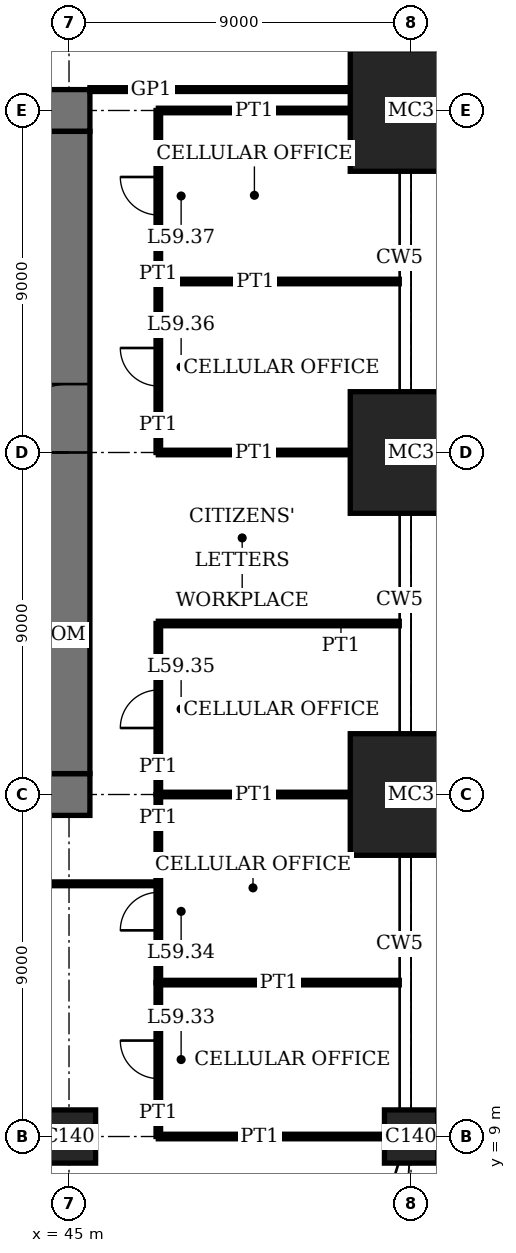
"""IFC4 building model, lengths in metres.
Left out: names, types, materials, properties, quantities, classifications, styles, units other than length and angle.
Written with IfcOpenShell. Run it as: python <this file> out.ifc"""

import sys

from ifc_helpers import new_model, si_unit, direction, frame, frame_2d, origin, origin_2d, place, context, subcontext, project, spatial, rectangle, extrude, element, fill, save


model = new_model("IFC4")
c1 = context("Model", 3, precision=1e-05, world=origin(), true_north=direction((0.0, 1.0)))
c2 = subcontext(c1, "Body", "Model", "MODEL_VIEW")
j1 = project(units=[si_unit("LENGTHUNIT", "METRE"), si_unit("PLANEANGLEUNIT", "RADIAN")], contexts=[c1])
p1 = place(None, origin())
s1 = spatial("IfcSite", under=j1, at=p1, CompositionType="ELEMENT")
p2 = place(p1, origin())
s2 = spatial("IfcBuilding", under=s1, at=p2, CompositionType="ELEMENT")
p3 = place(p2, frame((0.0, 0.0, 243.4)))
s3 = spatial("IfcBuildingStorey", under=s2, at=p3, CompositionType="ELEMENT", Elevation=243.4)
for number, where, z_axis, x_axis in (
    (1, (45.0, 9.0, 0.0), (0.0, 0.0, 1.0), (1.0, 0.0, 0.0)),
    (2, (54.0, 9.0, 0.0), (0.0, 0.0, 1.0), (1.0, 0.0, 0.0)),
):
    element("IfcColumn", number, at=place(p3, frame(where, z_axis=z_axis, x_axis=x_axis)), inside=s3, PredefinedType="COLUMN", context=c2, shape_type="SweptSolid", body=[
        extrude(rectangle(XDim=1.4, YDim=1.4, at=origin_2d()), origin(), (0.0, 0.0, 1.0), 4.0),
    ])
for number, where, z_axis, x_axis in (
    (3, (54.0, 18.0, 0.0), (0.0, 0.0, 1.0), (1.0, 0.0, 0.0)),
    (4, (54.0, 27.0, 0.0), (0.0, 0.0, 1.0), (1.0, 0.0, 0.0)),
    (5, (54.0, 36.0, 0.0), (0.0, 0.0, 1.0), (1.0, 0.0, 0.0)),
):
    element("IfcColumn", number, at=place(p3, frame(where, z_axis=z_axis, x_axis=x_axis)), inside=s3, PredefinedType="COLUMN", context=c2, shape_type="SweptSolid", body=[
        extrude(rectangle(XDim=3.2, YDim=3.2, at=origin_2d()), origin(), (0.0, 0.0, 1.0), 4.0),
    ])
p4 = place(p3, frame((17.45, 18.0, 0.0), z_axis=(0.0, 0.0, 1.0), x_axis=(1.0, 0.0, 0.0)))
e6 = element("IfcWall", 6, at=p4, inside=s3, PredefinedType="SHEAR", context=c2, shape_type="SweptSolid", body=[
    extrude(rectangle(XDim=28.1, YDim=1.1, at=frame_2d((14.05, 0.0))), origin(), (0.0, 0.0, 1.0), 4.0),
])
p5 = place(p4, frame((11.55, 0.0, 0.0)))
e7 = element("IfcOpeningElement", 7, at=p5, cuts=e6, PredefinedType="OPENING", context=c2, shape_type="SweptSolid", body=[
    extrude(rectangle(XDim=1.0, YDim=2.4, at=frame_2d((0.5, 1.2))), frame((0.0, 0.56, 0.0), z_axis=(0.0, -1.0, 0.0), x_axis=(1.0, 0.0, 0.0)), (0.0, 0.0, 1.0), 1.12),
])
p6 = place(p4, frame((16.55, 0.0, 0.0)))
e8 = element("IfcOpeningElement", 8, at=p6, cuts=e6, PredefinedType="OPENING", context=c2, shape_type="SweptSolid", body=[
    extrude(rectangle(XDim=1.0, YDim=2.4, at=frame_2d((0.5, 1.2))), frame((0.0, 0.56, 0.0), z_axis=(0.0, -1.0, 0.0), x_axis=(1.0, 0.0, 0.0)), (0.0, 0.0, 1.0), 1.12),
])
p7 = place(p4, frame((20.0, 0.0, 0.0)))
e9 = element("IfcOpeningElement", 9, at=p7, cuts=e6, PredefinedType="OPENING", context=c2, shape_type="SweptSolid", body=[
    extrude(rectangle(XDim=1.1, YDim=2.4, at=frame_2d((0.55, 1.2))), frame((0.0, 0.56, 0.0), z_axis=(0.0, -1.0, 0.0), x_axis=(1.0, 0.0, 0.0)), (0.0, 0.0, 1.0), 1.12),
])
p8 = place(p4, frame((24.05, 0.0, 0.0)))
e10 = element("IfcOpeningElement", 10, at=p8, cuts=e6, PredefinedType="OPENING", context=c2, shape_type="SweptSolid", body=[
    extrude(rectangle(XDim=1.0, YDim=2.4, at=frame_2d((0.5, 1.2))), frame((0.0, 0.56, 0.0), z_axis=(0.0, -1.0, 0.0), x_axis=(1.0, 0.0, 0.0)), (0.0, 0.0, 1.0), 1.12),
])
p9 = place(p3, frame((45.55, 36.0, 0.0), z_axis=(0.0, 0.0, 1.0), x_axis=(-1.0, 0.0, 0.0)))
e11 = element("IfcWall", 11, at=p9, inside=s3, PredefinedType="SHEAR", context=c2, shape_type="SweptSolid", body=[
    extrude(rectangle(XDim=28.1, YDim=1.1, at=frame_2d((14.05, 0.0))), origin(), (0.0, 0.0, 1.0), 4.0),
])
p10 = place(p9, frame((11.55, 0.0, 0.0)))
e12 = element("IfcOpeningElement", 12, at=p10, cuts=e11, PredefinedType="OPENING", context=c2, shape_type="SweptSolid", body=[
    extrude(rectangle(XDim=1.0, YDim=2.4, at=frame_2d((0.5, 1.2))), frame((0.0, 0.56, 0.0), z_axis=(0.0, -1.0, 0.0), x_axis=(1.0, 0.0, 0.0)), (0.0, 0.0, 1.0), 1.12),
])
p11 = place(p9, frame((16.55, 0.0, 0.0)))
e13 = element("IfcOpeningElement", 13, at=p11, cuts=e11, PredefinedType="OPENING", context=c2, shape_type="SweptSolid", body=[
    extrude(rectangle(XDim=1.0, YDim=2.4, at=frame_2d((0.5, 1.2))), frame((0.0, 0.56, 0.0), z_axis=(0.0, -1.0, 0.0), x_axis=(1.0, 0.0, 0.0)), (0.0, 0.0, 1.0), 1.12),
])
p12 = place(p9, frame((20.0, 0.0, 0.0)))
e14 = element("IfcOpeningElement", 14, at=p12, cuts=e11, PredefinedType="OPENING", context=c2, shape_type="SweptSolid", body=[
    extrude(rectangle(XDim=1.1, YDim=2.4, at=frame_2d((0.55, 1.2))), frame((0.0, 0.56, 0.0), z_axis=(0.0, -1.0, 0.0), x_axis=(1.0, 0.0, 0.0)), (0.0, 0.0, 1.0), 1.12),
])
p13 = place(p9, frame((24.05, 0.0, 0.0)))
e15 = element("IfcOpeningElement", 15, at=p13, cuts=e11, PredefinedType="OPENING", context=c2, shape_type="SweptSolid", body=[
    extrude(rectangle(XDim=1.0, YDim=2.4, at=frame_2d((0.5, 1.2))), frame((0.0, 0.56, 0.0), z_axis=(0.0, -1.0, 0.0), x_axis=(1.0, 0.0, 0.0)), (0.0, 0.0, 1.0), 1.12),
])
p14 = place(p3, frame((45.0, 18.55, 0.0), z_axis=(0.0, 0.0, 1.0), x_axis=(0.0, 1.0, 0.0)))
e16 = element("IfcWall", 16, at=p14, inside=s3, PredefinedType="SHEAR", context=c2, shape_type="SweptSolid", body=[
    extrude(rectangle(XDim=16.9, YDim=1.1, at=frame_2d((8.45, 0.0))), origin(), (0.0, 0.0, 1.0), 4.0),
])
p15 = place(p14, frame((8.45, 0.0, 0.0)))
e17 = element("IfcOpeningElement", 17, at=p15, cuts=e16, PredefinedType="OPENING", context=c2, shape_type="SweptSolid", body=[
    extrude(rectangle(XDim=1.8, YDim=2.4, at=frame_2d((0.9, 1.2))), frame((0.0, 0.56, 0.0), z_axis=(0.0, -1.0, 0.0), x_axis=(1.0, 0.0, 0.0)), (0.0, 0.0, 1.0), 1.12),
])
p16 = place(p3, frame((47.35, 9.0, 0.0), z_axis=(0.0, 0.0, 1.0), x_axis=(1.0, 0.0, 0.0)))
e18 = element("IfcWall", 18, at=p16, inside=s3, PredefinedType="PARTITIONING", context=c2, shape_type="SweptSolid", body=[
    extrude(rectangle(XDim=5.95, YDim=0.12, at=frame_2d((2.975, 0.0))), origin(), (0.0, 0.0, 1.0), 3.05),
])
p17 = place(p3, frame((47.35, 13.05, 0.0), z_axis=(0.0, 0.0, 1.0), x_axis=(1.0, 0.0, 0.0)))
e19 = element("IfcWall", 19, at=p17, inside=s3, PredefinedType="PARTITIONING", context=c2, shape_type="SweptSolid", body=[
    extrude(rectangle(XDim=6.34, YDim=0.12, at=frame_2d((3.17, 0.0))), origin(), (0.0, 0.0, 1.0), 3.75),
])
p18 = place(p3, frame((36.01, 15.65, 0.0), z_axis=(0.0, 0.0, 1.0), x_axis=(1.0, 0.0, 0.0)))
e20 = element("IfcWall", 20, at=p18, inside=s3, PredefinedType="PARTITIONING", context=c2, shape_type="SweptSolid", body=[
    extrude(rectangle(XDim=11.33, YDim=0.1, at=frame_2d((5.665, 0.0))), origin(), (0.0, 0.0, 1.0), 3.75),
])
p19 = place(p18, frame((5.165, 0.0, 0.0)))
e21 = element("IfcOpeningElement", 21, at=p19, cuts=e20, PredefinedType="OPENING", context=c2, shape_type="SweptSolid", body=[
    extrude(rectangle(XDim=1.0, YDim=2.4, at=frame_2d((0.5, 1.2))), frame((0.0, 0.06, 0.0), z_axis=(0.0, -1.0, 0.0), x_axis=(1.0, 0.0, 0.0)), (0.0, 0.0, 1.0), 0.12),
])
p20 = place(p3, frame((47.35, 18.0, 0.0), z_axis=(0.0, 0.0, 1.0), x_axis=(1.0, 0.0, 0.0)))
e22 = element("IfcWall", 22, at=p20, inside=s3, PredefinedType="PARTITIONING", context=c2, shape_type="SweptSolid", body=[
    extrude(rectangle(XDim=5.05, YDim=0.12, at=frame_2d((2.525, 0.0))), origin(), (0.0, 0.0, 1.0), 3.05),
])
p21 = place(p3, frame((47.35, 22.5, 0.0), z_axis=(0.0, 0.0, 1.0), x_axis=(1.0, 0.0, 0.0)))
e23 = element("IfcWall", 23, at=p21, inside=s3, PredefinedType="PARTITIONING", context=c2, shape_type="SweptSolid", body=[
    extrude(rectangle(XDim=6.34, YDim=0.12, at=frame_2d((3.17, 0.0))), origin(), (0.0, 0.0, 1.0), 3.1),
])
p22 = place(p3, frame((47.35, 27.0, 0.0), z_axis=(0.0, 0.0, 1.0), x_axis=(1.0, 0.0, 0.0)))
e24 = element("IfcWall", 24, at=p22, inside=s3, PredefinedType="PARTITIONING", context=c2, shape_type="SweptSolid", body=[
    extrude(rectangle(XDim=5.05, YDim=0.12, at=frame_2d((2.525, 0.0))), origin(), (0.0, 0.0, 1.0), 3.05),
])
p23 = place(p3, frame((47.35, 31.5, 0.0), z_axis=(0.0, 0.0, 1.0), x_axis=(1.0, 0.0, 0.0)))
e25 = element("IfcWall", 25, at=p23, inside=s3, PredefinedType="PARTITIONING", context=c2, shape_type="SweptSolid", body=[
    extrude(rectangle(XDim=6.34, YDim=0.12, at=frame_2d((3.17, 0.0))), origin(), (0.0, 0.0, 1.0), 3.1),
])
p24 = place(p3, frame((47.35, 36.0, 0.0), z_axis=(0.0, 0.0, 1.0), x_axis=(1.0, 0.0, 0.0)))
e26 = element("IfcWall", 26, at=p24, inside=s3, PredefinedType="PARTITIONING", context=c2, shape_type="SweptSolid", body=[
    extrude(rectangle(XDim=5.05, YDim=0.12, at=frame_2d((2.525, 0.0))), origin(), (0.0, 0.0, 1.0), 3.05),
])
p25 = place(p3, frame((45.55, 36.55, 0.0), z_axis=(0.0, 0.0, 1.0), x_axis=(1.0, 0.0, 0.0)))
e27 = element("IfcWall", 27, at=p25, inside=s3, PredefinedType="PARTITIONING", context=c2, shape_type="SweptSolid", body=[
    extrude(rectangle(XDim=6.85, YDim=0.1, at=frame_2d((3.425, 0.0))), origin(), (0.0, 0.0, 1.0), 3.75),
])
p26 = place(p3, frame((47.35, 9.0, 0.0), z_axis=(0.0, 0.0, 1.0), x_axis=(0.0, 1.0, 0.0)))
e28 = element("IfcWall", 28, at=p26, inside=s3, PredefinedType="PARTITIONING", context=c2, shape_type="SweptSolid", body=[
    extrude(rectangle(XDim=4.05, YDim=0.12, at=frame_2d((2.025, 0.0))), origin(), (0.0, 0.0, 1.0), 3.75),
])
p27 = place(p26, frame((1.525, 0.0, 0.0)))
e29 = element("IfcOpeningElement", 29, at=p27, cuts=e28, PredefinedType="OPENING", context=c2, shape_type="SweptSolid", body=[
    extrude(rectangle(XDim=1.0, YDim=2.4, at=frame_2d((0.5, 1.2))), frame((0.0, 0.07, 0.0), z_axis=(0.0, -1.0, 0.0), x_axis=(1.0, 0.0, 0.0)), (0.0, 0.0, 1.0), 0.14),
])
p28 = place(p3, frame((47.35, 13.05, 0.0), z_axis=(0.0, 0.0, 1.0), x_axis=(0.0, 1.0, 0.0)))
e30 = element("IfcWall", 30, at=p28, inside=s3, PredefinedType="PARTITIONING", context=c2, shape_type="SweptSolid", body=[
    extrude(rectangle(XDim=4.95, YDim=0.12, at=frame_2d((2.475, 0.0))), origin(), (0.0, 0.0, 1.0), 3.75),
])
p29 = place(p28, frame((1.375, 0.0, 0.0)))
e31 = element("IfcOpeningElement", 31, at=p29, cuts=e30, PredefinedType="OPENING", context=c2, shape_type="SweptSolid", body=[
    extrude(rectangle(XDim=1.0, YDim=2.4, at=frame_2d((0.5, 1.2))), frame((0.0, 0.07, 0.0), z_axis=(0.0, -1.0, 0.0), x_axis=(1.0, 0.0, 0.0)), (0.0, 0.0, 1.0), 0.14),
])
p30 = place(p3, frame((47.35, 18.0, 0.0), z_axis=(0.0, 0.0, 1.0), x_axis=(0.0, 1.0, 0.0)))
e32 = element("IfcWall", 32, at=p30, inside=s3, PredefinedType="PARTITIONING", context=c2, shape_type="SweptSolid", body=[
    extrude(rectangle(XDim=4.5, YDim=0.12, at=frame_2d((2.25, 0.0))), origin(), (0.0, 0.0, 1.0), 3.75),
])
p31 = place(p30, frame((1.75, 0.0, 0.0)))
e33 = element("IfcOpeningElement", 33, at=p31, cuts=e32, PredefinedType="OPENING", context=c2, shape_type="SweptSolid", body=[
    extrude(rectangle(XDim=1.0, YDim=2.4, at=frame_2d((0.5, 1.2))), frame((0.0, 0.07, 0.0), z_axis=(0.0, -1.0, 0.0), x_axis=(1.0, 0.0, 0.0)), (0.0, 0.0, 1.0), 0.14),
])
p32 = place(p3, frame((47.35, 27.0, 0.0), z_axis=(0.0, 0.0, 1.0), x_axis=(0.0, 1.0, 0.0)))
e34 = element("IfcWall", 34, at=p32, inside=s3, PredefinedType="PARTITIONING", context=c2, shape_type="SweptSolid", body=[
    extrude(rectangle(XDim=4.5, YDim=0.12, at=frame_2d((2.25, 0.0))), origin(), (0.0, 0.0, 1.0), 3.75),
])
p33 = place(p32, frame((1.75, 0.0, 0.0)))
e35 = element("IfcOpeningElement", 35, at=p33, cuts=e34, PredefinedType="OPENING", context=c2, shape_type="SweptSolid", body=[
    extrude(rectangle(XDim=1.0, YDim=2.4, at=frame_2d((0.5, 1.2))), frame((0.0, 0.07, 0.0), z_axis=(0.0, -1.0, 0.0), x_axis=(1.0, 0.0, 0.0)), (0.0, 0.0, 1.0), 0.14),
])
p34 = place(p3, frame((47.35, 31.5, 0.0), z_axis=(0.0, 0.0, 1.0), x_axis=(0.0, 1.0, 0.0)))
e36 = element("IfcWall", 36, at=p34, inside=s3, PredefinedType="PARTITIONING", context=c2, shape_type="SweptSolid", body=[
    extrude(rectangle(XDim=4.5, YDim=0.12, at=frame_2d((2.25, 0.0))), origin(), (0.0, 0.0, 1.0), 3.75),
])
p35 = place(p34, frame((1.75, 0.0, 0.0)))
e37 = element("IfcOpeningElement", 37, at=p35, cuts=e36, PredefinedType="OPENING", context=c2, shape_type="SweptSolid", body=[
    extrude(rectangle(XDim=1.0, YDim=2.4, at=frame_2d((0.5, 1.2))), frame((0.0, 0.07, 0.0), z_axis=(0.0, -1.0, 0.0), x_axis=(1.0, 0.0, 0.0)), (0.0, 0.0, 1.0), 0.14),
])
p36 = place(p15, origin())
e38 = element("IfcDoor", 38, at=p36, inside=s3, OperationType="DOUBLE_DOOR_DOUBLE_SWING", PredefinedType="DOOR", context=c2, shape_type="SweptSolid", body=[
    extrude(rectangle(XDim=1.8, YDim=2.4, at=frame_2d((0.9, 1.2))), frame((0.0, 0.03, 0.0), z_axis=(0.0, -1.0, 0.0), x_axis=(1.0, 0.0, 0.0)), (0.0, 0.0, 1.0), 0.06),
    extrude(rectangle(XDim=0.04, YDim=2.4, at=frame_2d((0.02, 1.2))), frame((0.0, 0.55, 0.0), z_axis=(0.0, -1.0, 0.0), x_axis=(1.0, 0.0, 0.0)), (0.0, 0.0, 1.0), 1.1),
    extrude(rectangle(XDim=0.04, YDim=2.4, at=frame_2d((1.78, 1.2))), frame((0.0, 0.55, 0.0), z_axis=(0.0, -1.0, 0.0), x_axis=(1.0, 0.0, 0.0)), (0.0, 0.0, 1.0), 1.1),
    extrude(rectangle(XDim=1.8, YDim=0.04, at=frame_2d((0.9, 2.38))), frame((0.0, 0.55, 0.0), z_axis=(0.0, -1.0, 0.0), x_axis=(1.0, 0.0, 0.0)), (0.0, 0.0, 1.0), 1.1),
])
fill(e17, e38)
p37 = place(p27, origin())
e39 = element("IfcDoor", 39, at=p37, inside=s3, OperationType="SINGLE_SWING_LEFT", PredefinedType="DOOR", context=c2, shape_type="SweptSolid", body=[
    extrude(rectangle(XDim=1.0, YDim=2.4, at=frame_2d((0.5, 1.2))), frame((0.0, 0.025, 0.0), z_axis=(0.0, -1.0, 0.0), x_axis=(1.0, 0.0, 0.0)), (0.0, 0.0, 1.0), 0.05),
])
fill(e29, e39)
p38 = place(p29, origin())
e40 = element("IfcDoor", 40, at=p38, inside=s3, OperationType="SINGLE_SWING_RIGHT", PredefinedType="DOOR", context=c2, shape_type="SweptSolid", body=[
    extrude(rectangle(XDim=1.0, YDim=2.4, at=frame_2d((0.5, 1.2))), frame((0.0, 0.025, 0.0), z_axis=(0.0, -1.0, 0.0), x_axis=(1.0, 0.0, 0.0)), (0.0, 0.0, 1.0), 0.05),
])
fill(e31, e40)
p39 = place(p31, origin())
e41 = element("IfcDoor", 41, at=p39, inside=s3, OperationType="SINGLE_SWING_RIGHT", PredefinedType="DOOR", context=c2, shape_type="SweptSolid", body=[
    extrude(rectangle(XDim=1.0, YDim=2.4, at=frame_2d((0.5, 1.2))), frame((0.0, 0.025, 0.0), z_axis=(0.0, -1.0, 0.0), x_axis=(1.0, 0.0, 0.0)), (0.0, 0.0, 1.0), 0.05),
])
fill(e33, e41)
p40 = place(p33, origin())
e42 = element("IfcDoor", 42, at=p40, inside=s3, OperationType="SINGLE_SWING_LEFT", PredefinedType="DOOR", context=c2, shape_type="SweptSolid", body=[
    extrude(rectangle(XDim=1.0, YDim=2.4, at=frame_2d((0.5, 1.2))), frame((0.0, 0.025, 0.0), z_axis=(0.0, -1.0, 0.0), x_axis=(1.0, 0.0, 0.0)), (0.0, 0.0, 1.0), 0.05),
])
fill(e35, e42)
p41 = place(p35, origin())
e43 = element("IfcDoor", 43, at=p41, inside=s3, OperationType="SINGLE_SWING_LEFT", PredefinedType="DOOR", context=c2, shape_type="SweptSolid", body=[
    extrude(rectangle(XDim=1.0, YDim=2.4, at=frame_2d((0.5, 1.2))), frame((0.0, 0.025, 0.0), z_axis=(0.0, -1.0, 0.0), x_axis=(1.0, 0.0, 0.0)), (0.0, 0.0, 1.0), 0.05),
])
fill(e37, e43)
save(model, sys.argv[1])
